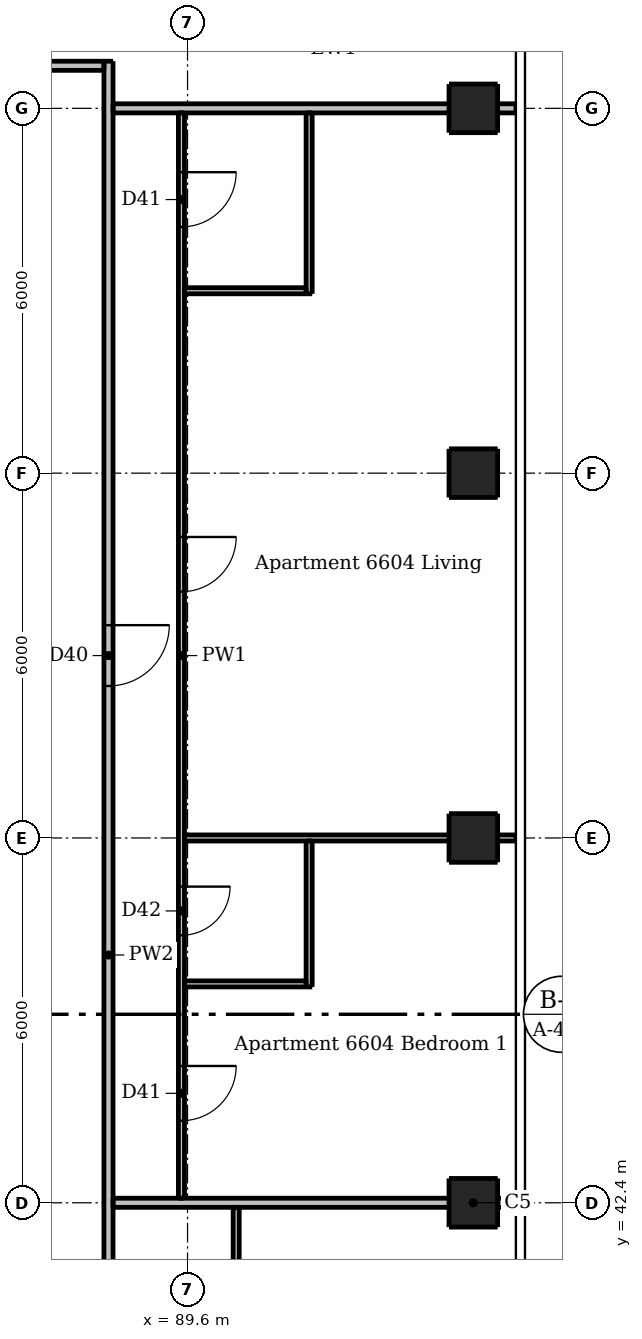
"""IFC4 building model, lengths in metres.
Left out: names, types, materials, properties, quantities, classifications, styles, units other than length and angle.
Written with IfcOpenShell. Run it as: python <this file> out.ifc"""

import sys

from ifc_helpers import new_model, si_unit, direction, frame, frame_2d, origin, origin_2d, place, context, subcontext, project, spatial, rectangle, extrude, element, fill, save


model = new_model("IFC4")
c1 = context("Model", 3, precision=1e-05, world=origin(), true_north=direction((0.0, 1.0)))
c2 = subcontext(c1, "Body", "Model", "MODEL_VIEW")
j1 = project(units=[si_unit("LENGTHUNIT", "METRE"), si_unit("PLANEANGLEUNIT", "RADIAN")], contexts=[c1])
p1 = place(None, origin())
s1 = spatial("IfcSite", under=j1, at=p1, CompositionType="ELEMENT")
p2 = place(p1, origin())
s2 = spatial("IfcBuilding", under=s1, at=p2, CompositionType="ELEMENT")
p3 = place(p2, frame((0.0, 0.0, 248.8)))
s3 = spatial("IfcBuildingStorey", under=s2, at=p3, CompositionType="ELEMENT", Elevation=248.8)
for number, where, z_axis, x_axis in (
    (1, (94.3, 42.4, 0.0), (0.0, 0.0, 1.0), (1.0, 0.0, 0.0)),
    (2, (94.3, 48.4, 0.0), (0.0, 0.0, 1.0), (1.0, 0.0, 0.0)),
    (3, (94.3, 54.4, 0.0), (0.0, 0.0, 1.0), (1.0, 0.0, 0.0)),
    (4, (94.3, 60.4, 0.0), (0.0, 0.0, 1.0), (1.0, 0.0, 0.0)),
):
    element("IfcColumn", number, at=place(p3, frame(where, z_axis=z_axis, x_axis=x_axis)), inside=s3, PredefinedType="COLUMN", context=c2, shape_type="SweptSolid", body=[
        extrude(rectangle(XDim=0.8, YDim=0.8, at=origin_2d()), origin(), (0.0, 0.0, 1.0), 3.05),
    ])
p4 = place(p3, frame((89.5, 60.325, 0.0), z_axis=(0.0, 0.0, 1.0), x_axis=(0.0, -1.0, 0.0)))
e5 = element("IfcWall", 5, at=p4, inside=s3, PredefinedType="PARTITIONING", context=c2, shape_type="SweptSolid", body=[
    extrude(rectangle(XDim=17.85, YDim=0.1, at=frame_2d((8.925, 0.0))), origin(), (0.0, 0.0, 1.0), 3.05),
])
p5 = place(p4, frame((6.975, 0.0, 0.0)))
e6 = element("IfcOpeningElement", 6, at=p5, cuts=e5, PredefinedType="OPENING", context=c2, shape_type="SweptSolid", body=[
    extrude(rectangle(XDim=0.9, YDim=2.1, at=frame_2d((0.45, 1.05))), frame((0.0, 0.06, 0.0), z_axis=(0.0, -1.0, 0.0), x_axis=(1.0, 0.0, 0.0)), (0.0, 0.0, 1.0), 0.12),
])
p6 = place(p4, frame((0.975, 0.0, 0.0)))
e7 = element("IfcOpeningElement", 7, at=p6, cuts=e5, PredefinedType="OPENING", context=c2, shape_type="SweptSolid", body=[
    extrude(rectangle(XDim=0.9, YDim=2.1, at=frame_2d((0.45, 1.05))), frame((0.0, 0.06, 0.0), z_axis=(0.0, -1.0, 0.0), x_axis=(1.0, 0.0, 0.0)), (0.0, 0.0, 1.0), 0.12),
])
p7 = place(p4, frame((15.675, 0.0, 0.0)))
e8 = element("IfcOpeningElement", 8, at=p7, cuts=e5, PredefinedType="OPENING", context=c2, shape_type="SweptSolid", body=[
    extrude(rectangle(XDim=0.9, YDim=2.1, at=frame_2d((0.45, 1.05))), frame((0.0, 0.06, 0.0), z_axis=(0.0, -1.0, 0.0), x_axis=(1.0, 0.0, 0.0)), (0.0, 0.0, 1.0), 0.12),
])
p8 = place(p4, frame((12.725, 0.0, 0.0)))
e9 = element("IfcOpeningElement", 9, at=p8, cuts=e5, PredefinedType="OPENING", context=c2, shape_type="SweptSolid", body=[
    extrude(rectangle(XDim=0.8, YDim=2.1, at=frame_2d((0.4, 1.05))), frame((0.0, 0.06, 0.0), z_axis=(0.0, -1.0, 0.0), x_axis=(1.0, 0.0, 0.0)), (0.0, 0.0, 1.0), 0.12),
])
p9 = place(p3, frame((90.4, 35.65, 0.0), z_axis=(0.0, 0.0, 1.0), x_axis=(0.0, 1.0, 0.0)))
e10 = element("IfcWall", 10, at=p9, inside=s3, PredefinedType="PARTITIONING", context=c2, shape_type="SweptSolid", body=[
    extrude(rectangle(XDim=6.675, YDim=0.1, at=frame_2d((3.337, 0.0))), origin(), (0.0, 0.0, 1.0), 3.05),
])
p10 = place(p9, frame((4.15, 0.0, 0.0)))
e11 = element("IfcOpeningElement", 11, at=p10, cuts=e10, PredefinedType="OPENING", context=c2, shape_type="SweptSolid", body=[
    extrude(rectangle(XDim=0.8, YDim=2.1, at=frame_2d((0.4, 1.05))), frame((0.0, 0.06, 0.0), z_axis=(0.0, -1.0, 0.0), x_axis=(1.0, 0.0, 0.0)), (0.0, 0.0, 1.0), 0.12),
])
p11 = place(p3, frame((91.6, 45.95, 0.0), z_axis=(0.0, 0.0, 1.0), x_axis=(0.0, 1.0, 0.0)))
e12 = element("IfcWall", 12, at=p11, inside=s3, PredefinedType="PARTITIONING", context=c2, shape_type="SweptSolid", body=[
    extrude(rectangle(XDim=2.4, YDim=0.1, at=frame_2d((1.2, 0.0))), origin(), (0.0, 0.0, 1.0), 3.05),
])
p12 = place(p3, frame((91.6, 57.35, 0.0), z_axis=(0.0, 0.0, 1.0), x_axis=(0.0, 1.0, 0.0)))
e13 = element("IfcWall", 13, at=p12, inside=s3, PredefinedType="PARTITIONING", context=c2, shape_type="SweptSolid", body=[
    extrude(rectangle(XDim=2.975, YDim=0.1, at=frame_2d((1.487, 0.0))), origin(), (0.0, 0.0, 1.0), 3.05),
])
p13 = place(p3, frame((89.55, 57.4, 0.0), z_axis=(0.0, 0.0, 1.0), x_axis=(1.0, 0.0, 0.0)))
e14 = element("IfcWall", 14, at=p13, inside=s3, PredefinedType="PARTITIONING", context=c2, shape_type="SweptSolid", body=[
    extrude(rectangle(XDim=2.0, YDim=0.1, at=frame_2d((1.0, 0.0))), origin(), (0.0, 0.0, 1.0), 3.05),
])
p14 = place(p3, frame((89.55, 48.4, 0.0), z_axis=(0.0, 0.0, 1.0), x_axis=(1.0, 0.0, 0.0)))
e15 = element("IfcWall", 15, at=p14, inside=s3, PredefinedType="PARTITIONING", context=c2, shape_type="SweptSolid", body=[
    extrude(rectangle(XDim=5.45, YDim=0.1, at=frame_2d((2.725, 0.0))), origin(), (0.0, 0.0, 1.0), 2.59),
])
p15 = place(p3, frame((89.55, 46.0, 0.0), z_axis=(0.0, 0.0, 1.0), x_axis=(1.0, 0.0, 0.0)))
e16 = element("IfcWall", 16, at=p15, inside=s3, PredefinedType="PARTITIONING", context=c2, shape_type="SweptSolid", body=[
    extrude(rectangle(XDim=2.0, YDim=0.1, at=frame_2d((1.0, 0.0))), origin(), (0.0, 0.0, 1.0), 3.05),
])
p16 = place(p3, frame((88.3, 61.175, 0.0), z_axis=(0.0, 0.0, 1.0), x_axis=(0.0, -1.0, 0.0)))
e17 = element("IfcWall", 17, at=p16, inside=s3, PredefinedType="PARTITIONING", context=c2, shape_type="SweptSolid", body=[
    extrude(rectangle(XDim=29.4, YDim=0.15, at=frame_2d((14.7, 0.0))), origin(), (0.0, 0.0, 1.0), 3.05),
])
p17 = place(p16, frame((27.025, 0.0, 0.0)))
e18 = element("IfcOpeningElement", 18, at=p17, cuts=e17, PredefinedType="OPENING", context=c2, shape_type="SweptSolid", body=[
    extrude(rectangle(XDim=1.0, YDim=2.1, at=frame_2d((0.5, 1.05))), frame((0.0, 0.085, 0.0), z_axis=(0.0, -1.0, 0.0), x_axis=(1.0, 0.0, 0.0)), (0.0, 0.0, 1.0), 0.17),
])
p18 = place(p16, frame((9.275, 0.0, 0.0)))
e19 = element("IfcOpeningElement", 19, at=p18, cuts=e17, PredefinedType="OPENING", context=c2, shape_type="SweptSolid", body=[
    extrude(rectangle(XDim=1.0, YDim=2.1, at=frame_2d((0.5, 1.05))), frame((0.0, 0.085, 0.0), z_axis=(0.0, -1.0, 0.0), x_axis=(1.0, 0.0, 0.0)), (0.0, 0.0, 1.0), 0.17),
])
p19 = place(p3, frame((58.975, 61.1, 0.0), z_axis=(0.0, 0.0, 1.0), x_axis=(1.0, 0.0, 0.0)))
e20 = element("IfcWall", 20, at=p19, inside=s3, PredefinedType="PARTITIONING", context=c2, shape_type="SweptSolid", body=[
    extrude(rectangle(XDim=29.25, YDim=0.15, at=frame_2d((14.625, 0.0))), origin(), (0.0, 0.0, 1.0), 3.05),
])
p20 = place(p19, frame((9.125, 0.0, 0.0)))
e21 = element("IfcOpeningElement", 21, at=p20, cuts=e20, PredefinedType="OPENING", context=c2, shape_type="SweptSolid", body=[
    extrude(rectangle(XDim=1.0, YDim=2.1, at=frame_2d((0.5, 1.05))), frame((0.0, 0.085, 0.0), z_axis=(0.0, -1.0, 0.0), x_axis=(1.0, 0.0, 0.0)), (0.0, 0.0, 1.0), 0.17),
])
p21 = place(p19, frame((26.475, 0.0, 0.0)))
e22 = element("IfcOpeningElement", 22, at=p21, cuts=e20, PredefinedType="OPENING", context=c2, shape_type="SweptSolid", body=[
    extrude(rectangle(XDim=1.0, YDim=2.1, at=frame_2d((0.5, 1.05))), frame((0.0, 0.085, 0.0), z_axis=(0.0, -1.0, 0.0), x_axis=(1.0, 0.0, 0.0)), (0.0, 0.0, 1.0), 0.17),
])
p22 = place(p3, frame((88.375, 60.4, 0.0), z_axis=(0.0, 0.0, 1.0), x_axis=(1.0, 0.0, 0.0)))
e23 = element("IfcWall", 23, at=p22, inside=s3, PredefinedType="PARTITIONING", context=c2, shape_type="SweptSolid", body=[
    extrude(rectangle(XDim=6.625, YDim=0.15, at=frame_2d((3.312, 0.0))), origin(), (0.0, 0.0, 1.0), 2.647),
])
p23 = place(p3, frame((88.375, 42.4, 0.0), z_axis=(0.0, 0.0, 1.0), x_axis=(1.0, 0.0, 0.0)))
e24 = element("IfcWall", 24, at=p23, inside=s3, PredefinedType="PARTITIONING", context=c2, shape_type="SweptSolid", body=[
    extrude(rectangle(XDim=6.625, YDim=0.15, at=frame_2d((3.312, 0.0))), origin(), (0.0, 0.0, 1.0), 2.59),
])
p24 = place(p18, origin())
e25 = element("IfcDoor", 25, at=p24, inside=s3, OperationType="SINGLE_SWING_LEFT", PredefinedType="DOOR", context=c2, shape_type="SweptSolid", body=[
    extrude(rectangle(XDim=1.0, YDim=2.1, at=frame_2d((0.5, 1.05))), frame((0.0, 0.025, 0.0), z_axis=(0.0, -1.0, 0.0), x_axis=(1.0, 0.0, 0.0)), (0.0, 0.0, 1.0), 0.05),
])
fill(e19, e25)
p25 = place(p5, origin())
e26 = element("IfcDoor", 26, at=p25, inside=s3, OperationType="SINGLE_SWING_LEFT", PredefinedType="DOOR", context=c2, shape_type="SweptSolid", body=[
    extrude(rectangle(XDim=0.9, YDim=2.1, at=frame_2d((0.45, 1.05))), frame((0.0, 0.025, 0.0), z_axis=(0.0, -1.0, 0.0), x_axis=(1.0, 0.0, 0.0)), (0.0, 0.0, 1.0), 0.05),
])
fill(e6, e26)
p26 = place(p6, origin())
e27 = element("IfcDoor", 27, at=p26, inside=s3, OperationType="SINGLE_SWING_LEFT", PredefinedType="DOOR", context=c2, shape_type="SweptSolid", body=[
    extrude(rectangle(XDim=0.9, YDim=2.1, at=frame_2d((0.45, 1.05))), frame((0.0, 0.025, 0.0), z_axis=(0.0, -1.0, 0.0), x_axis=(1.0, 0.0, 0.0)), (0.0, 0.0, 1.0), 0.05),
])
fill(e7, e27)
p27 = place(p7, origin())
e28 = element("IfcDoor", 28, at=p27, inside=s3, OperationType="SINGLE_SWING_LEFT", PredefinedType="DOOR", context=c2, shape_type="SweptSolid", body=[
    extrude(rectangle(XDim=0.9, YDim=2.1, at=frame_2d((0.45, 1.05))), frame((0.0, 0.025, 0.0), z_axis=(0.0, -1.0, 0.0), x_axis=(1.0, 0.0, 0.0)), (0.0, 0.0, 1.0), 0.05),
])
fill(e8, e28)
p28 = place(p8, origin())
e29 = element("IfcDoor", 29, at=p28, inside=s3, OperationType="SINGLE_SWING_LEFT", PredefinedType="DOOR", context=c2, shape_type="SweptSolid", body=[
    extrude(rectangle(XDim=0.8, YDim=2.1, at=frame_2d((0.4, 1.05))), frame((0.0, 0.025, 0.0), z_axis=(0.0, -1.0, 0.0), x_axis=(1.0, 0.0, 0.0)), (0.0, 0.0, 1.0), 0.05),
])
fill(e9, e29)
save(model, sys.argv[1])
